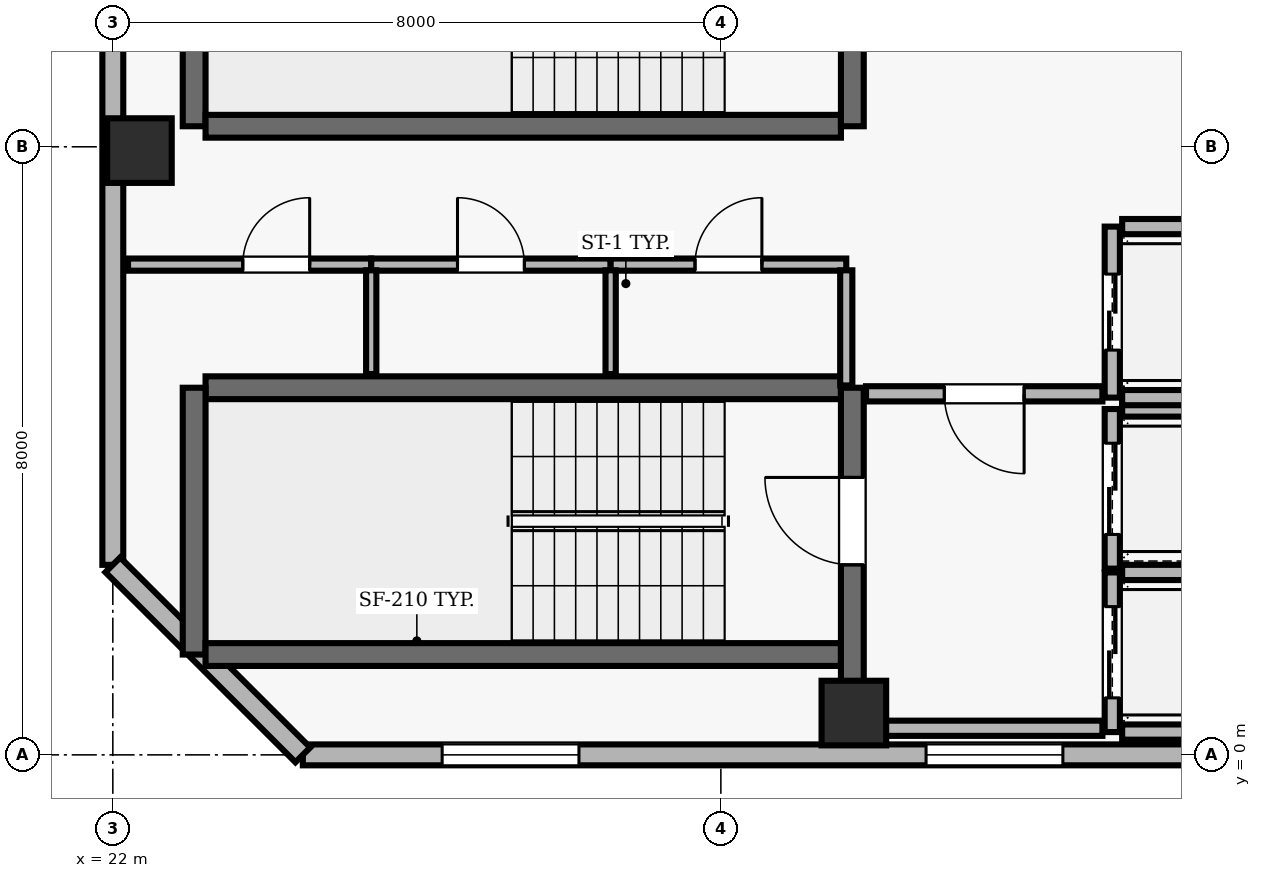
"""IFC4 building model, lengths in metres.
Left out: names, types, materials, properties, quantities, classifications, styles, units other than length and angle.
Written with IfcOpenShell. Run it as: python <this file> out.ifc"""

import sys

from ifc_helpers import new_model, si_unit, direction, frame, frame_2d, origin, origin_2d, place, context, subcontext, project, spatial, rectangle, extrude, element, fill, save


model = new_model("IFC4")
c1 = context("Model", 3, precision=1e-05, world=origin(), true_north=direction((0.0, 1.0)))
c2 = subcontext(c1, "Body", "Model", "MODEL_VIEW")
j1 = project(units=[si_unit("LENGTHUNIT", "METRE"), si_unit("PLANEANGLEUNIT", "RADIAN")], contexts=[c1])
p1 = place(None, origin())
s1 = spatial("IfcSite", under=j1, at=p1, CompositionType="ELEMENT")
p2 = place(p1, origin())
s2 = spatial("IfcBuilding", under=s1, at=p2, CompositionType="ELEMENT")
p3 = place(p2, frame((0.0, 0.0, 302.8)))
s3 = spatial("IfcBuildingStorey", under=s2, at=p3, CompositionType="ELEMENT", Elevation=302.8)
for number, where, z_axis, x_axis in (
    (1, (31.75, 0.55, 0.0), (0.0, 0.0, 1.0), (1.0, 0.0, 0.0)),
    (2, (22.35, 7.95, 0.0), (0.0, 0.0, 1.0), (1.0, 0.0, 0.0)),
):
    element("IfcColumn", number, at=place(p3, frame(where, z_axis=z_axis, x_axis=x_axis)), inside=s3, PredefinedType="COLUMN", context=c2, shape_type="SweptSolid", body=[
        extrude(rectangle(XDim=0.85, YDim=0.85, at=origin_2d()), origin(), (0.0, 0.0, 1.0), 3.9),
    ])
p4 = place(p3, frame((24.5, 0.0, 0.0), z_axis=(0.0, 0.0, 1.0), x_axis=(1.0, 0.0, 0.0)))
e3 = element("IfcWall", 3, at=p4, inside=s3, PredefinedType="SOLIDWALL", context=c2, shape_type="SweptSolid", body=[
    extrude(rectangle(XDim=32.8, YDim=0.275, at=frame_2d((16.4, 0.0))), origin(), (0.0, 0.0, 1.0), 3.64),
])
p5 = place(p4, frame((1.833, 0.0, 0.9)))
e4 = element("IfcOpeningElement", 4, at=p5, cuts=e3, PredefinedType="OPENING", context=c2, shape_type="SweptSolid", body=[
    extrude(rectangle(XDim=1.8, YDim=1.6, at=frame_2d((0.9, 0.8))), frame((0.0, 0.147, 0.0), z_axis=(0.0, -1.0, 0.0), x_axis=(1.0, 0.0, 0.0)), (0.0, 0.0, 1.0), 0.295),
])
p6 = place(p4, frame((8.2, 0.0, 0.9)))
e5 = element("IfcOpeningElement", 5, at=p6, cuts=e3, PredefinedType="OPENING", context=c2, shape_type="SweptSolid", body=[
    extrude(rectangle(XDim=1.8, YDim=1.6, at=frame_2d((0.9, 0.8))), frame((0.0, 0.147, 0.0), z_axis=(0.0, -1.0, 0.0), x_axis=(1.0, 0.0, 0.0)), (0.0, 0.0, 1.0), 0.295),
])
p7 = place(p4, frame((24.15, 0.0, 0.9)))
e6 = element("IfcOpeningElement", 6, at=p7, cuts=e3, PredefinedType="OPENING", context=c2, shape_type="SweptSolid", body=[
    extrude(rectangle(XDim=1.8, YDim=1.6, at=frame_2d((0.9, 0.8))), frame((0.0, 0.147, 0.0), z_axis=(0.0, -1.0, 0.0), x_axis=(1.0, 0.0, 0.0)), (0.0, 0.0, 1.0), 0.295),
])
p8 = place(p4, frame((29.167, 0.0, 0.9)))
e7 = element("IfcOpeningElement", 7, at=p8, cuts=e3, PredefinedType="OPENING", context=c2, shape_type="SweptSolid", body=[
    extrude(rectangle(XDim=1.8, YDim=1.6, at=frame_2d((0.9, 0.8))), frame((0.0, 0.147, 0.0), z_axis=(0.0, -1.0, 0.0), x_axis=(1.0, 0.0, 0.0)), (0.0, 0.0, 1.0), 0.295),
])
p9 = place(p3, frame((22.0, 35.3, 0.0), z_axis=(0.0, 0.0, 1.0), x_axis=(0.0, -1.0, 0.0)))
e8 = element("IfcWall", 8, at=p9, inside=s3, PredefinedType="SOLIDWALL", context=c2, shape_type="SweptSolid", body=[
    extrude(rectangle(XDim=32.8, YDim=0.275, at=frame_2d((16.4, 0.0))), origin(), (0.0, 0.0, 1.0), 3.64),
])
p10 = place(p9, frame((7.3, 0.0, 0.0)))
e9 = element("IfcOpeningElement", 9, at=p10, cuts=e8, PredefinedType="OPENING", context=c2, shape_type="SweptSolid", body=[
    extrude(rectangle(XDim=1.0, YDim=2.2, at=frame_2d((0.5, 1.1))), frame((0.0, 0.147, 0.0), z_axis=(0.0, -1.0, 0.0), x_axis=(1.0, 0.0, 0.0)), (0.0, 0.0, 1.0), 0.295),
])
p11 = place(p9, frame((2.283, 0.0, 0.9)))
e10 = element("IfcOpeningElement", 10, at=p11, cuts=e8, PredefinedType="OPENING", context=c2, shape_type="SweptSolid", body=[
    extrude(rectangle(XDim=1.8, YDim=1.6, at=frame_2d((0.9, 0.8))), frame((0.0, 0.147, 0.0), z_axis=(0.0, -1.0, 0.0), x_axis=(1.0, 0.0, 0.0)), (0.0, 0.0, 1.0), 0.295),
])
p12 = place(p9, frame((12.767, 0.0, 0.9)))
e11 = element("IfcOpeningElement", 11, at=p12, cuts=e8, PredefinedType="OPENING", context=c2, shape_type="SweptSolid", body=[
    extrude(rectangle(XDim=1.8, YDim=1.6, at=frame_2d((0.9, 0.8))), frame((0.0, 0.147, 0.0), z_axis=(0.0, -1.0, 0.0), x_axis=(1.0, 0.0, 0.0)), (0.0, 0.0, 1.0), 0.295),
])
p13 = place(p9, frame((18.233, 0.0, 0.9)))
e12 = element("IfcOpeningElement", 12, at=p13, cuts=e8, PredefinedType="OPENING", context=c2, shape_type="SweptSolid", body=[
    extrude(rectangle(XDim=1.8, YDim=1.6, at=frame_2d((0.9, 0.8))), frame((0.0, 0.147, 0.0), z_axis=(0.0, -1.0, 0.0), x_axis=(1.0, 0.0, 0.0)), (0.0, 0.0, 1.0), 0.295),
])
p14 = place(p9, frame((23.7, 0.0, 0.9)))
e13 = element("IfcOpeningElement", 13, at=p14, cuts=e8, PredefinedType="OPENING", context=c2, shape_type="SweptSolid", body=[
    extrude(rectangle(XDim=1.8, YDim=1.6, at=frame_2d((0.9, 0.8))), frame((0.0, 0.147, 0.0), z_axis=(0.0, -1.0, 0.0), x_axis=(1.0, 0.0, 0.0)), (0.0, 0.0, 1.0), 0.295),
])
p15 = place(p3, frame((22.0, 2.5, 0.0), z_axis=(0.0, 0.0, 1.0), x_axis=(0.707106781187, -0.707106781187, 0.0)))
e14 = element("IfcWall", 14, at=p15, inside=s3, PredefinedType="SOLIDWALL", context=c2, shape_type="SweptSolid", body=[
    extrude(rectangle(XDim=3.536, YDim=0.275, at=frame_2d((1.768, 0.0))), origin(), (0.0, 0.0, 1.0), 3.64),
])
p16 = place(p3, frame((31.58, 4.83, 0.0), z_axis=(0.0, 0.0, 1.0), x_axis=(-1.0, 0.0, 0.0)))
e15 = element("IfcWall", 15, at=p16, inside=s3, PredefinedType="SHEAR", context=c2, shape_type="SweptSolid", body=[
    extrude(rectangle(XDim=8.36, YDim=0.3, at=frame_2d((4.18, 0.0))), origin(), (0.0, 0.0, 1.0), 3.64),
])
p17 = place(p3, frame((23.07, 4.83, 0.0), z_axis=(0.0, 0.0, 1.0), x_axis=(0.0, -1.0, 0.0)))
e16 = element("IfcWall", 16, at=p17, inside=s3, PredefinedType="SHEAR", context=c2, shape_type="SweptSolid", body=[
    extrude(rectangle(XDim=3.51, YDim=0.3, at=frame_2d((1.755, 0.0))), origin(), (0.0, 0.0, 1.0), 3.64),
])
p18 = place(p3, frame((23.22, 1.32, 0.0), z_axis=(0.0, 0.0, 1.0), x_axis=(1.0, 0.0, 0.0)))
e17 = element("IfcWall", 17, at=p18, inside=s3, PredefinedType="SHEAR", context=c2, shape_type="SweptSolid", body=[
    extrude(rectangle(XDim=8.36, YDim=0.3, at=frame_2d((4.18, 0.0))), origin(), (0.0, 0.0, 1.0), 3.64),
])
p19 = place(p3, frame((31.73, 0.96, 0.0), z_axis=(0.0, 0.0, 1.0), x_axis=(0.0, 1.0, 0.0)))
e18 = element("IfcWall", 18, at=p19, inside=s3, PredefinedType="SHEAR", context=c2, shape_type="SweptSolid", body=[
    extrude(rectangle(XDim=3.87, YDim=0.3, at=frame_2d((1.935, 0.0))), origin(), (0.0, 0.0, 1.0), 3.64),
])
p20 = place(p19, frame((1.54, 0.0, 0.0)))
e19 = element("IfcOpeningElement", 19, at=p20, cuts=e18, PredefinedType="OPENING", context=c2, shape_type="SweptSolid", body=[
    extrude(rectangle(XDim=1.15, YDim=2.15, at=frame_2d((0.575, 1.075))), frame((0.0, 0.16, 0.0), z_axis=(0.0, -1.0, 0.0), x_axis=(1.0, 0.0, 0.0)), (0.0, 0.0, 1.0), 0.32),
])
p21 = place(p3, frame((23.07, 11.78, 0.0), z_axis=(0.0, 0.0, 1.0), x_axis=(0.0, -1.0, 0.0)))
e20 = element("IfcWall", 20, at=p21, inside=s3, PredefinedType="SHEAR", context=c2, shape_type="SweptSolid", body=[
    extrude(rectangle(XDim=3.51, YDim=0.3, at=frame_2d((1.755, 0.0))), origin(), (0.0, 0.0, 1.0), 3.64),
])
p22 = place(p3, frame((23.22, 8.27, 0.0), z_axis=(0.0, 0.0, 1.0), x_axis=(1.0, 0.0, 0.0)))
e21 = element("IfcWall", 21, at=p22, inside=s3, PredefinedType="SHEAR", context=c2, shape_type="SweptSolid", body=[
    extrude(rectangle(XDim=8.36, YDim=0.3, at=frame_2d((4.18, 0.0))), origin(), (0.0, 0.0, 1.0), 3.64),
])
p23 = place(p3, frame((31.73, 8.27, 0.0), z_axis=(0.0, 0.0, 1.0), x_axis=(0.0, 1.0, 0.0)))
e22 = element("IfcWall", 22, at=p23, inside=s3, PredefinedType="SHEAR", context=c2, shape_type="SweptSolid", body=[
    extrude(rectangle(XDim=3.51, YDim=0.3, at=frame_2d((1.755, 0.0))), origin(), (0.0, 0.0, 1.0), 3.64),
])
p24 = place(p23, frame((1.18, 0.0, 0.0)))
e23 = element("IfcOpeningElement", 23, at=p24, cuts=e22, PredefinedType="OPENING", context=c2, shape_type="SweptSolid", body=[
    extrude(rectangle(XDim=1.15, YDim=2.15, at=frame_2d((0.575, 1.075))), frame((0.0, 0.16, 0.0), z_axis=(0.0, -1.0, 0.0), x_axis=(1.0, 0.0, 0.0)), (0.0, 0.0, 1.0), 0.32),
])
p25 = place(p3, frame((35.15, 2.4, 0.0), z_axis=(0.0, 0.0, 1.0), x_axis=(0.0, -1.0, 0.0)))
e24 = element("IfcWall", 24, at=p25, inside=s3, PredefinedType="SOLIDWALL", context=c2, shape_type="SweptSolid", body=[
    extrude(rectangle(XDim=2.1, YDim=0.2, at=frame_2d((1.05, 0.0))), origin(), (0.0, 0.0, 1.0), 3.64),
])
p26 = place(p25, frame((0.45, 0.0, 0.0)))
e25 = element("IfcOpeningElement", 25, at=p26, cuts=e24, PredefinedType="OPENING", context=c2, shape_type="SweptSolid", body=[
    extrude(rectangle(XDim=1.2, YDim=2.15, at=frame_2d((0.6, 1.075))), frame((0.0, 0.11, 0.0), z_axis=(0.0, -1.0, 0.0), x_axis=(1.0, 0.0, 0.0)), (0.0, 0.0, 1.0), 0.22),
])
for number, where, z_axis, x_axis in (
    (26, (35.28, 0.3, 0.0), (0.0, 0.0, 1.0), (1.0, 0.0, 0.0)),
    (27, (37.42, 2.4, 0.0), (0.0, 0.0, 1.0), (-1.0, 0.0, 0.0)),
):
    element("IfcWall", number, at=place(p3, frame(where, z_axis=z_axis, x_axis=x_axis)), inside=s3, PredefinedType="SOLIDWALL", context=c2, shape_type="SweptSolid", body=[
        extrude(rectangle(XDim=2.14, YDim=0.2, at=frame_2d((1.07, 0.0))), origin(), (0.0, 0.0, 1.0), 3.64),
    ])
p27 = place(p3, frame((35.15, 4.55, 0.0), z_axis=(0.0, 0.0, 1.0), x_axis=(0.0, -1.0, 0.0)))
e28 = element("IfcWall", 28, at=p27, inside=s3, PredefinedType="SOLIDWALL", context=c2, shape_type="SweptSolid", body=[
    extrude(rectangle(XDim=2.1, YDim=0.2, at=frame_2d((1.05, 0.0))), origin(), (0.0, 0.0, 1.0), 3.64),
])
p28 = place(p27, frame((0.45, 0.0, 0.0)))
e29 = element("IfcOpeningElement", 29, at=p28, cuts=e28, PredefinedType="OPENING", context=c2, shape_type="SweptSolid", body=[
    extrude(rectangle(XDim=1.2, YDim=2.15, at=frame_2d((0.6, 1.075))), frame((0.0, 0.11, 0.0), z_axis=(0.0, -1.0, 0.0), x_axis=(1.0, 0.0, 0.0)), (0.0, 0.0, 1.0), 0.22),
])
p29 = place(p3, frame((37.42, 4.55, 0.0), z_axis=(0.0, 0.0, 1.0), x_axis=(-1.0, 0.0, 0.0)))
e30 = element("IfcWall", 30, at=p29, inside=s3, PredefinedType="SOLIDWALL", context=c2, shape_type="SweptSolid", body=[
    extrude(rectangle(XDim=2.14, YDim=0.2, at=frame_2d((1.07, 0.0))), origin(), (0.0, 0.0, 1.0), 3.64),
])
p30 = place(p3, frame((35.15, 6.95, 0.0), z_axis=(0.0, 0.0, 1.0), x_axis=(0.0, -1.0, 0.0)))
e31 = element("IfcWall", 31, at=p30, inside=s3, PredefinedType="SOLIDWALL", context=c2, shape_type="SweptSolid", body=[
    extrude(rectangle(XDim=2.25, YDim=0.2, at=frame_2d((1.125, 0.0))), origin(), (0.0, 0.0, 1.0), 3.64),
])
p31 = place(p30, frame((0.625, 0.0, 0.0)))
e32 = element("IfcOpeningElement", 32, at=p31, cuts=e31, PredefinedType="OPENING", context=c2, shape_type="SweptSolid", body=[
    extrude(rectangle(XDim=1.0, YDim=2.1, at=frame_2d((0.5, 1.05))), frame((0.0, 0.11, 0.0), z_axis=(0.0, -1.0, 0.0), x_axis=(1.0, 0.0, 0.0)), (0.0, 0.0, 1.0), 0.22),
])
for number, where, z_axis, x_axis in (
    (33, (35.28, 4.7, 0.0), (0.0, 0.0, 1.0), (1.0, 0.0, 0.0)),
    (34, (37.42, 6.95, 0.0), (0.0, 0.0, 1.0), (-1.0, 0.0, 0.0)),
):
    element("IfcWall", number, at=place(p3, frame(where, z_axis=z_axis, x_axis=x_axis)), inside=s3, PredefinedType="SOLIDWALL", context=c2, shape_type="SweptSolid", body=[
        extrude(rectangle(XDim=2.14, YDim=0.2, at=frame_2d((1.07, 0.0))), origin(), (0.0, 0.0, 1.0), 3.64),
    ])
p32 = place(p3, frame((22.2, 6.45, 0.0), z_axis=(0.0, 0.0, 1.0), x_axis=(1.0, 0.0, 0.0)))
e35 = element("IfcWall", 35, at=p32, inside=s3, PredefinedType="PARTITIONING", context=c2, shape_type="SweptSolid", body=[
    extrude(rectangle(XDim=3.2, YDim=0.16, at=frame_2d((1.6, 0.0))), origin(), (0.0, 0.0, 1.0), 3.64),
])
p33 = place(p32, frame((1.51, 0.0, 0.0)))
e36 = element("IfcOpeningElement", 36, at=p33, cuts=e35, PredefinedType="OPENING", context=c2, shape_type="SweptSolid", body=[
    extrude(rectangle(XDim=0.88, YDim=2.1, at=frame_2d((0.44, 1.05))), frame((0.0, 0.09, 0.0), z_axis=(0.0, -1.0, 0.0), x_axis=(1.0, 0.0, 0.0)), (0.0, 0.0, 1.0), 0.18),
])
p34 = place(p3, frame((25.4, 6.45, 0.0), z_axis=(0.0, 0.0, 1.0), x_axis=(1.0, 0.0, 0.0)))
e37 = element("IfcWall", 37, at=p34, inside=s3, PredefinedType="PARTITIONING", context=c2, shape_type="SweptSolid", body=[
    extrude(rectangle(XDim=3.15, YDim=0.16, at=frame_2d((1.575, 0.0))), origin(), (0.0, 0.0, 1.0), 3.64),
])
p35 = place(p34, frame((1.135, 0.0, 0.0)))
e38 = element("IfcOpeningElement", 38, at=p35, cuts=e37, PredefinedType="OPENING", context=c2, shape_type="SweptSolid", body=[
    extrude(rectangle(XDim=0.88, YDim=2.1, at=frame_2d((0.44, 1.05))), frame((0.0, 0.09, 0.0), z_axis=(0.0, -1.0, 0.0), x_axis=(1.0, 0.0, 0.0)), (0.0, 0.0, 1.0), 0.18),
])
p36 = place(p3, frame((28.55, 6.45, 0.0), z_axis=(0.0, 0.0, 1.0), x_axis=(1.0, 0.0, 0.0)))
e39 = element("IfcWall", 39, at=p36, inside=s3, PredefinedType="PARTITIONING", context=c2, shape_type="SweptSolid", body=[
    extrude(rectangle(XDim=3.1, YDim=0.16, at=frame_2d((1.55, 0.0))), origin(), (0.0, 0.0, 1.0), 3.64),
])
p37 = place(p36, frame((1.11, 0.0, 0.0)))
e40 = element("IfcOpeningElement", 40, at=p37, cuts=e39, PredefinedType="OPENING", context=c2, shape_type="SweptSolid", body=[
    extrude(rectangle(XDim=0.88, YDim=2.1, at=frame_2d((0.44, 1.05))), frame((0.0, 0.09, 0.0), z_axis=(0.0, -1.0, 0.0), x_axis=(1.0, 0.0, 0.0)), (0.0, 0.0, 1.0), 0.18),
])
p38 = place(p3, frame((31.65, 0.35, 0.0), z_axis=(0.0, 0.0, 1.0), x_axis=(1.0, 0.0, 0.0)))
e41 = element("IfcWall", 41, at=p38, inside=s3, PredefinedType="SOLIDWALL", context=c2, shape_type="SweptSolid", body=[
    extrude(rectangle(XDim=3.37, YDim=0.2, at=frame_2d((1.685, 0.0))), origin(), (0.0, 0.0, 1.0), 3.64),
])
p39 = place(p3, frame((35.02, 4.75, 0.0), z_axis=(0.0, 0.0, 1.0), x_axis=(-1.0, 0.0, 0.0)))
e42 = element("IfcWall", 42, at=p39, inside=s3, PredefinedType="SOLIDWALL", context=c2, shape_type="SweptSolid", body=[
    extrude(rectangle(XDim=3.11, YDim=0.2, at=frame_2d((1.555, 0.0))), origin(), (0.0, 0.0, 1.0), 3.64),
])
p40 = place(p39, frame((1.03, 0.0, 0.0)))
e43 = element("IfcOpeningElement", 43, at=p40, cuts=e42, PredefinedType="OPENING", context=c2, shape_type="SweptSolid", body=[
    extrude(rectangle(XDim=1.05, YDim=2.15, at=frame_2d((0.525, 1.075))), frame((0.0, 0.11, 0.0), z_axis=(0.0, -1.0, 0.0), x_axis=(1.0, 0.0, 0.0)), (0.0, 0.0, 1.0), 0.22),
])
for number, where, z_axis, x_axis in (
    (44, (25.4, 5.01, 0.0), (0.0, 0.0, 1.0), (0.0, 1.0, 0.0)),
    (45, (28.55, 5.01, 0.0), (0.0, 0.0, 1.0), (0.0, 1.0, 0.0)),
):
    element("IfcWall", number, at=place(p3, frame(where, z_axis=z_axis, x_axis=x_axis)), inside=s3, PredefinedType="PARTITIONING", context=c2, shape_type="SweptSolid", body=[
        extrude(rectangle(XDim=1.365, YDim=0.135, at=frame_2d((0.683, 0.0))), origin(), (0.0, 0.0, 1.0), 3.64),
    ])
p41 = place(p3, frame((31.65, 4.86, 0.0), z_axis=(0.0, 0.0, 1.0), x_axis=(0.0, 1.0, 0.0)))
e46 = element("IfcWall", 46, at=p41, inside=s3, PredefinedType="PARTITIONING", context=c2, shape_type="SweptSolid", body=[
    extrude(rectangle(XDim=1.515, YDim=0.16, at=frame_2d((0.757, 0.0))), origin(), (0.0, 0.0, 1.0), 3.64),
])
p42 = place(p5, origin())
e47 = element("IfcWindow", 47, at=p42, inside=s3, PartitioningType="SINGLE_PANEL", PredefinedType="WINDOW", context=c2, shape_type="SweptSolid", body=[
    extrude(rectangle(XDim=1.8, YDim=1.6, at=frame_2d((0.9, 0.8))), frame((0.0, 0.03, 0.0), z_axis=(0.0, -1.0, 0.0), x_axis=(1.0, 0.0, 0.0)), (0.0, 0.0, 1.0), 0.06),
])
fill(e4, e47)
p43 = place(p6, origin())
e48 = element("IfcWindow", 48, at=p43, inside=s3, PartitioningType="SINGLE_PANEL", PredefinedType="WINDOW", context=c2, shape_type="SweptSolid", body=[
    extrude(rectangle(XDim=1.8, YDim=1.6, at=frame_2d((0.9, 0.8))), frame((0.0, 0.03, 0.0), z_axis=(0.0, -1.0, 0.0), x_axis=(1.0, 0.0, 0.0)), (0.0, 0.0, 1.0), 0.06),
])
fill(e5, e48)
p44 = place(p20, origin())
e49 = element("IfcDoor", 49, at=p44, inside=s3, OperationType="SINGLE_SWING_RIGHT", PredefinedType="DOOR", context=c2, shape_type="SweptSolid", body=[
    extrude(rectangle(XDim=1.15, YDim=2.15, at=frame_2d((0.575, 1.075))), frame((0.0, 0.025, 0.0), z_axis=(0.0, -1.0, 0.0), x_axis=(1.0, 0.0, 0.0)), (0.0, 0.0, 1.0), 0.05),
])
fill(e19, e49)
p45 = place(p26, origin())
e50 = element("IfcDoor", 50, at=p45, inside=s3, OperationType="DOUBLE_DOOR_SLIDING", PredefinedType="DOOR", context=c2, shape_type="SweptSolid", body=[
    extrude(rectangle(XDim=1.2, YDim=2.15, at=frame_2d((0.6, 1.075))), frame((0.0, 0.025, 0.0), z_axis=(0.0, -1.0, 0.0), x_axis=(1.0, 0.0, 0.0)), (0.0, 0.0, 1.0), 0.05),
])
fill(e25, e50)
p46 = place(p28, origin())
e51 = element("IfcDoor", 51, at=p46, inside=s3, OperationType="DOUBLE_DOOR_SLIDING", PredefinedType="DOOR", context=c2, shape_type="SweptSolid", body=[
    extrude(rectangle(XDim=1.2, YDim=2.15, at=frame_2d((0.6, 1.075))), frame((0.0, 0.025, 0.0), z_axis=(0.0, -1.0, 0.0), x_axis=(1.0, 0.0, 0.0)), (0.0, 0.0, 1.0), 0.05),
])
fill(e29, e51)
p47 = place(p31, origin())
e52 = element("IfcDoor", 52, at=p47, inside=s3, OperationType="DOUBLE_DOOR_SLIDING", PredefinedType="DOOR", context=c2, shape_type="SweptSolid", body=[
    extrude(rectangle(XDim=1.0, YDim=2.1, at=frame_2d((0.5, 1.05))), frame((0.0, 0.025, 0.0), z_axis=(0.0, -1.0, 0.0), x_axis=(1.0, 0.0, 0.0)), (0.0, 0.0, 1.0), 0.05),
])
fill(e32, e52)
p48 = place(p40, origin())
e53 = element("IfcDoor", 53, at=p48, inside=s3, OperationType="SINGLE_SWING_LEFT", PredefinedType="DOOR", context=c2, shape_type="SweptSolid", body=[
    extrude(rectangle(XDim=1.05, YDim=2.15, at=frame_2d((0.525, 1.075))), frame((0.0, 0.025, 0.0), z_axis=(0.0, -1.0, 0.0), x_axis=(1.0, 0.0, 0.0)), (0.0, 0.0, 1.0), 0.05),
])
fill(e43, e53)
p49 = place(p33, origin())
e54 = element("IfcDoor", 54, at=p49, inside=s3, OperationType="SINGLE_SWING_RIGHT", PredefinedType="DOOR", context=c2, shape_type="SweptSolid", body=[
    extrude(rectangle(XDim=0.88, YDim=2.1, at=frame_2d((0.44, 1.05))), frame((0.0, 0.025, 0.0), z_axis=(0.0, -1.0, 0.0), x_axis=(1.0, 0.0, 0.0)), (0.0, 0.0, 1.0), 0.05),
])
fill(e36, e54)
p50 = place(p35, origin())
e55 = element("IfcDoor", 55, at=p50, inside=s3, OperationType="SINGLE_SWING_LEFT", PredefinedType="DOOR", context=c2, shape_type="SweptSolid", body=[
    extrude(rectangle(XDim=0.88, YDim=2.1, at=frame_2d((0.44, 1.05))), frame((0.0, 0.025, 0.0), z_axis=(0.0, -1.0, 0.0), x_axis=(1.0, 0.0, 0.0)), (0.0, 0.0, 1.0), 0.05),
])
fill(e38, e55)
p51 = place(p37, origin())
e56 = element("IfcDoor", 56, at=p51, inside=s3, OperationType="SINGLE_SWING_RIGHT", PredefinedType="DOOR", context=c2, shape_type="SweptSolid", body=[
    extrude(rectangle(XDim=0.88, YDim=2.1, at=frame_2d((0.44, 1.05))), frame((0.0, 0.025, 0.0), z_axis=(0.0, -1.0, 0.0), x_axis=(1.0, 0.0, 0.0)), (0.0, 0.0, 1.0), 0.05),
])
fill(e40, e56)
save(model, sys.argv[1])
